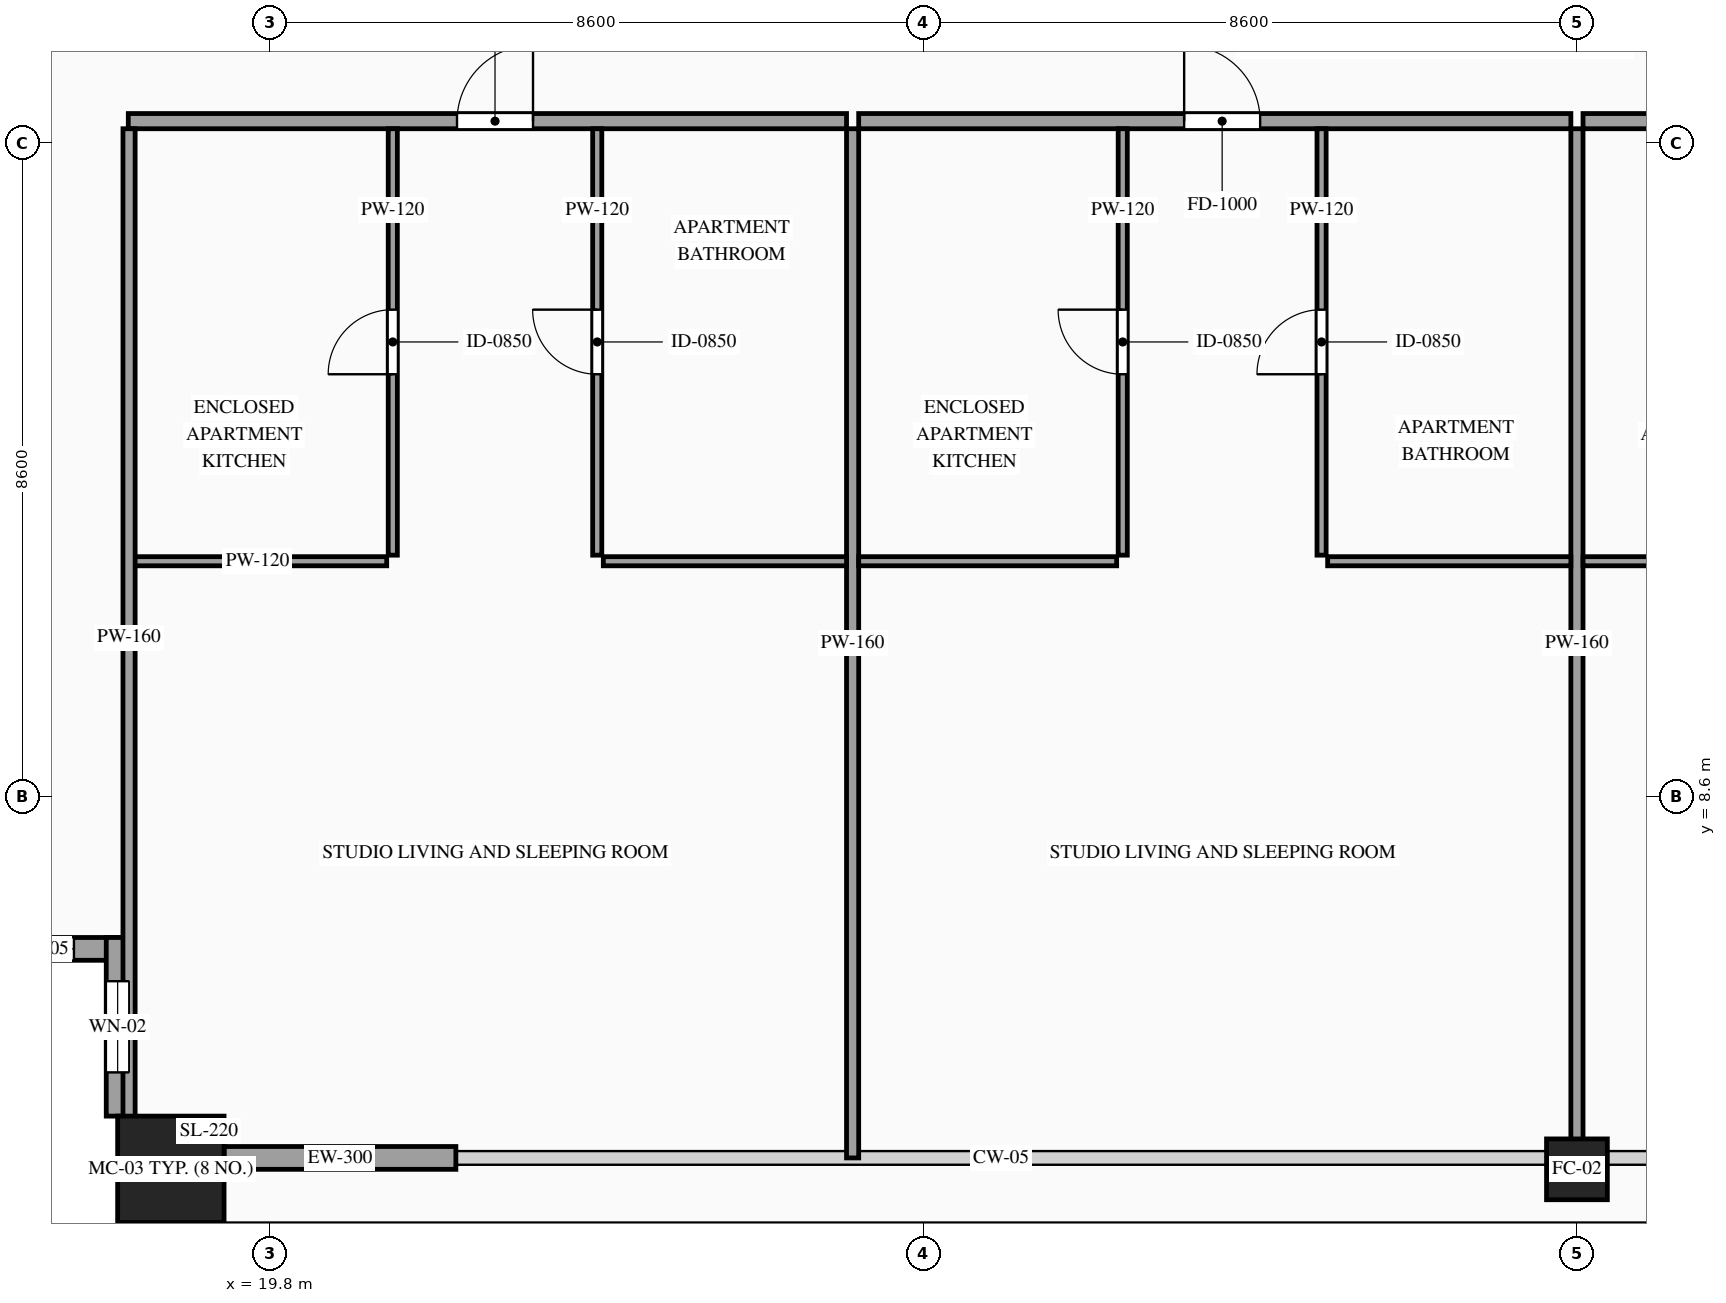
"""IFC4 building model, lengths in metres.
Left out: names, types, materials, properties, quantities, classifications, styles, units other than length and angle.
Written with IfcOpenShell. Run it as: python <this file> out.ifc"""

import sys

from ifc_helpers import new_model, si_unit, direction, frame, frame_2d, origin, origin_2d, place, context, subcontext, project, spatial, rectangle, hollow_rectangle, extrude, source, transform, mapped, element, fill, save


model = new_model("IFC4")
c1 = context("Model", 3, precision=1e-05, world=origin(), true_north=direction((0.0, 1.0)))
c2 = subcontext(c1, "Body", "Model", "MODEL_VIEW")
j1 = project(units=[si_unit("LENGTHUNIT", "METRE"), si_unit("PLANEANGLEUNIT", "RADIAN")], contexts=[c1])
p1 = place(None, origin())
s1 = spatial("IfcSite", under=j1, at=p1, CompositionType="ELEMENT")
p2 = place(p1, origin())
s2 = spatial("IfcBuilding", under=s1, at=p2, CompositionType="ELEMENT")
p3 = place(p2, frame((0.0, 0.0, 181.0)))
s3 = spatial("IfcBuildingStorey", under=s2, at=p3, CompositionType="ELEMENT", Elevation=181.0)
m1 = source(origin(), c2, "Body", "SweptSolid", [
    extrude(hollow_rectangle(XDim=1.4, YDim=1.4, WallThickness=0.06, at=origin_2d()), origin(), (0.0, 0.0, 1.0), 3.5),
])
p4 = place(p3, frame((18.5, 3.7, 0.0), z_axis=(0.0, 0.0, 1.0), x_axis=(1.0, 0.0, 0.0)))
e1 = element("IfcColumn", 1, at=p4, inside=s3, PredefinedType="COLUMN", context=c2, shape_type="MappedRepresentation", body=[
    mapped(m1, transform((0.0, 0.0, 0.0), scale=1.0)),
])
m2 = source(origin(), c2, "Body", "SweptSolid", [
    extrude(hollow_rectangle(XDim=0.8, YDim=0.8, WallThickness=0.036, at=origin_2d()), origin(), (0.0, 0.0, 1.0), 3.5),
])
p5 = place(p3, frame((37.0, 3.7, 0.0), z_axis=(0.0, 0.0, 1.0), x_axis=(1.0, 0.0, 0.0)))
e2 = element("IfcColumn", 2, at=p5, inside=s3, PredefinedType="COLUMN", context=c2, shape_type="MappedRepresentation", body=[
    mapped(m2, transform((0.0, 0.0, 0.0), scale=1.0)),
])
p6 = place(p3, frame((15.6, 6.6, 0.0), z_axis=(0.0, 0.0, 1.0), x_axis=(1.0, 0.0, 0.0)))
e3 = element("IfcWall", 3, at=p6, inside=s3, PredefinedType="SOLIDWALL", context=c2, shape_type="SweptSolid", body=[
    extrude(rectangle(XDim=2.35, YDim=0.3, at=frame_2d((1.175, 0.0))), origin(), (0.0, 0.0, 1.0), 3.28),
])
p7 = place(p6, frame((0.725, 0.0, 0.85)))
e4 = element("IfcOpeningElement", 4, at=p7, cuts=e3, PredefinedType="OPENING", context=c2, shape_type="SweptSolid", body=[
    extrude(rectangle(XDim=0.9, YDim=1.5, at=frame_2d((0.45, 0.75))), frame((0.0, 0.165, 0.0), z_axis=(0.0, -1.0, 0.0), x_axis=(1.0, 0.0, 0.0)), (0.0, 0.0, 1.0), 0.33),
])
p8 = place(p3, frame((17.8, 6.75, 0.0), z_axis=(0.0, 0.0, 1.0), x_axis=(0.0, -1.0, 0.0)))
e5 = element("IfcWall", 5, at=p8, inside=s3, PredefinedType="SOLIDWALL", context=c2, shape_type="SweptSolid", body=[
    extrude(rectangle(XDim=2.35, YDim=0.3, at=frame_2d((1.175, 0.0))), origin(), (0.0, 0.0, 1.0), 3.28),
])
p9 = place(p8, frame((0.575, 0.0, 0.85)))
e6 = element("IfcOpeningElement", 6, at=p9, cuts=e5, PredefinedType="OPENING", context=c2, shape_type="SweptSolid", body=[
    extrude(rectangle(XDim=1.2, YDim=2.1, at=frame_2d((0.6, 1.05))), frame((0.0, 0.165, 0.0), z_axis=(0.0, -1.0, 0.0), x_axis=(1.0, 0.0, 0.0)), (0.0, 0.0, 1.0), 0.33),
])
m3 = source(origin(), c2, "Body", "SweptSolid", [
    extrude(rectangle(XDim=3.05, YDim=0.3, at=frame_2d((1.525, 0.0))), origin(), (0.0, 0.0, 1.0), 2.835),
])
p10 = place(p3, frame((19.2, 3.85, 0.0), z_axis=(0.0, 0.0, 1.0), x_axis=(1.0, 0.0, 0.0)))
e7 = element("IfcWall", 7, at=p10, inside=s3, PredefinedType="SOLIDWALL", context=c2, shape_type="MappedRepresentation", body=[
    mapped(m3, transform((0.0, 0.0, 0.0), scale=1.0)),
])
p11 = place(p3, frame((17.94, 17.49, 0.0), z_axis=(0.0, 0.0, 1.0), x_axis=(1.0, 0.0, 0.0)))
e8 = element("IfcWall", 8, at=p11, inside=s3, PredefinedType="PARTITIONING", context=c2, shape_type="SweptSolid", body=[
    extrude(rectangle(XDim=9.45, YDim=0.2, at=frame_2d((4.725, 0.0))), origin(), (0.0, 0.0, 1.0), 3.28),
])
p12 = place(p11, frame((4.325, 0.0, 0.0)))
e9 = element("IfcOpeningElement", 9, at=p12, cuts=e8, PredefinedType="OPENING", context=c2, shape_type="SweptSolid", body=[
    extrude(rectangle(XDim=1.0, YDim=2.2, at=frame_2d((0.5, 1.1))), frame((0.0, 0.115, 0.0), z_axis=(0.0, -1.0, 0.0), x_axis=(1.0, 0.0, 0.0)), (0.0, 0.0, 1.0), 0.23),
])
m4 = source(origin(), c2, "Body", "SweptSolid", [
    extrude(rectangle(XDim=13.54, YDim=0.16, at=frame_2d((6.77, 0.0))), origin(), (0.0, 0.0, 1.0), 3.28),
])
p13 = place(p3, frame((27.47, 3.85, 0.0), z_axis=(0.0, 0.0, 1.0), x_axis=(0.0, 1.0, 0.0)))
e10 = element("IfcWall", 10, at=p13, inside=s3, PredefinedType="PARTITIONING", context=c2, shape_type="MappedRepresentation", body=[
    mapped(m4, transform((0.0, 0.0, 0.0), scale=1.0)),
])
m5 = source(origin(), c2, "Body", "SweptSolid", [
    extrude(rectangle(XDim=3.4, YDim=0.12, at=frame_2d((1.7, 0.0))), origin(), (0.0, 0.0, 1.0), 3.28),
])
p14 = place(p3, frame((17.94, 11.7, 0.0), z_axis=(0.0, 0.0, 1.0), x_axis=(1.0, 0.0, 0.0)))
e11 = element("IfcWall", 11, at=p14, inside=s3, PredefinedType="PARTITIONING", context=c2, shape_type="MappedRepresentation", body=[
    mapped(m5, transform((0.0, 0.0, 0.0), scale=1.0)),
])
p15 = place(p3, frame((21.42, 11.78, 0.0), z_axis=(0.0, 0.0, 1.0), x_axis=(0.0, 1.0, 0.0)))
e12 = element("IfcWall", 12, at=p15, inside=s3, PredefinedType="PARTITIONING", context=c2, shape_type="SweptSolid", body=[
    extrude(rectangle(XDim=5.61, YDim=0.12, at=frame_2d((2.805, 0.0))), origin(), (0.0, 0.0, 1.0), 3.28),
])
p16 = place(p15, frame((2.38, 0.0, 0.0)))
e13 = element("IfcOpeningElement", 13, at=p16, cuts=e12, PredefinedType="OPENING", context=c2, shape_type="SweptSolid", body=[
    extrude(rectangle(XDim=0.85, YDim=2.1, at=frame_2d((0.425, 1.05))), frame((0.0, 0.075, 0.0), z_axis=(0.0, -1.0, 0.0), x_axis=(1.0, 0.0, 0.0)), (0.0, 0.0, 1.0), 0.15),
])
m6 = source(origin(), c2, "Body", "SweptSolid", [
    extrude(rectangle(XDim=3.2, YDim=0.12, at=frame_2d((1.6, 0.0))), origin(), (0.0, 0.0, 1.0), 2.875),
])
p17 = place(p3, frame((24.19, 11.7, 0.0), z_axis=(0.0, 0.0, 1.0), x_axis=(1.0, 0.0, 0.0)))
e14 = element("IfcWall", 14, at=p17, inside=s3, PredefinedType="PARTITIONING", context=c2, shape_type="MappedRepresentation", body=[
    mapped(m6, transform((0.0, 0.0, 0.0), scale=1.0)),
])
p18 = place(p3, frame((24.11, 11.78, 0.0), z_axis=(0.0, 0.0, 1.0), x_axis=(0.0, 1.0, 0.0)))
e15 = element("IfcWall", 15, at=p18, inside=s3, PredefinedType="PARTITIONING", context=c2, shape_type="SweptSolid", body=[
    extrude(rectangle(XDim=5.61, YDim=0.12, at=frame_2d((2.805, 0.0))), origin(), (0.0, 0.0, 1.0), 3.28),
])
p19 = place(p18, frame((2.38, 0.0, 0.0)))
e16 = element("IfcOpeningElement", 16, at=p19, cuts=e15, PredefinedType="OPENING", context=c2, shape_type="SweptSolid", body=[
    extrude(rectangle(XDim=0.85, YDim=2.1, at=frame_2d((0.425, 1.05))), frame((0.0, 0.075, 0.0), z_axis=(0.0, -1.0, 0.0), x_axis=(1.0, 0.0, 0.0)), (0.0, 0.0, 1.0), 0.15),
])
p20 = place(p3, frame((27.55, 17.49, 0.0), z_axis=(0.0, 0.0, 1.0), x_axis=(1.0, 0.0, 0.0)))
e17 = element("IfcWall", 17, at=p20, inside=s3, PredefinedType="PARTITIONING", context=c2, shape_type="SweptSolid", body=[
    extrude(rectangle(XDim=9.37, YDim=0.2, at=frame_2d((4.685, 0.0))), origin(), (0.0, 0.0, 1.0), 3.28),
])
p21 = place(p20, frame((4.282, 0.0, 0.0)))
e18 = element("IfcOpeningElement", 18, at=p21, cuts=e17, PredefinedType="OPENING", context=c2, shape_type="SweptSolid", body=[
    extrude(rectangle(XDim=1.0, YDim=2.2, at=frame_2d((0.5, 1.1))), frame((0.0, 0.115, 0.0), z_axis=(0.0, -1.0, 0.0), x_axis=(1.0, 0.0, 0.0)), (0.0, 0.0, 1.0), 0.23),
])
m7 = source(origin(), c2, "Body", "SweptSolid", [
    extrude(rectangle(XDim=13.54, YDim=0.16, at=frame_2d((6.77, 0.0))), origin(), (0.0, 0.0, 1.0), 2.687),
])
p22 = place(p3, frame((37.0, 3.85, 0.0), z_axis=(0.0, 0.0, 1.0), x_axis=(0.0, 1.0, 0.0)))
e19 = element("IfcWall", 19, at=p22, inside=s3, PredefinedType="PARTITIONING", context=c2, shape_type="MappedRepresentation", body=[
    mapped(m7, transform((0.0, 0.0, 0.0), scale=1.0)),
])
m8 = source(origin(), c2, "Body", "SweptSolid", [
    extrude(rectangle(XDim=3.394, YDim=0.12, at=frame_2d((1.697, 0.0))), origin(), (0.0, 0.0, 1.0), 2.875),
])
p23 = place(p3, frame((27.55, 11.7, 0.0), z_axis=(0.0, 0.0, 1.0), x_axis=(1.0, 0.0, 0.0)))
e20 = element("IfcWall", 20, at=p23, inside=s3, PredefinedType="PARTITIONING", context=c2, shape_type="MappedRepresentation", body=[
    mapped(m8, transform((0.0, 0.0, 0.0), scale=1.0)),
])
p24 = place(p3, frame((31.024, 11.78, 0.0), z_axis=(0.0, 0.0, 1.0), x_axis=(0.0, 1.0, 0.0)))
e21 = element("IfcWall", 21, at=p24, inside=s3, PredefinedType="PARTITIONING", context=c2, shape_type="SweptSolid", body=[
    extrude(rectangle(XDim=5.61, YDim=0.12, at=frame_2d((2.805, 0.0))), origin(), (0.0, 0.0, 1.0), 3.28),
])
p25 = place(p24, frame((2.38, 0.0, 0.0)))
e22 = element("IfcOpeningElement", 22, at=p25, cuts=e21, PredefinedType="OPENING", context=c2, shape_type="SweptSolid", body=[
    extrude(rectangle(XDim=0.85, YDim=2.1, at=frame_2d((0.425, 1.05))), frame((0.0, 0.075, 0.0), z_axis=(0.0, -1.0, 0.0), x_axis=(1.0, 0.0, 0.0)), (0.0, 0.0, 1.0), 0.15),
])
p26 = place(p3, frame((33.72, 11.7, 0.0), z_axis=(0.0, 0.0, 1.0), x_axis=(1.0, 0.0, 0.0)))
e23 = element("IfcWall", 23, at=p26, inside=s3, PredefinedType="PARTITIONING", context=c2, shape_type="MappedRepresentation", body=[
    mapped(m6, transform((0.0, 0.0, 0.0), scale=1.0)),
])
p27 = place(p3, frame((33.64, 11.78, 0.0), z_axis=(0.0, 0.0, 1.0), x_axis=(0.0, 1.0, 0.0)))
e24 = element("IfcWall", 24, at=p27, inside=s3, PredefinedType="PARTITIONING", context=c2, shape_type="SweptSolid", body=[
    extrude(rectangle(XDim=5.61, YDim=0.12, at=frame_2d((2.805, 0.0))), origin(), (0.0, 0.0, 1.0), 3.28),
])
p28 = place(p27, frame((2.38, 0.0, 0.0)))
e25 = element("IfcOpeningElement", 25, at=p28, cuts=e24, PredefinedType="OPENING", context=c2, shape_type="SweptSolid", body=[
    extrude(rectangle(XDim=0.85, YDim=2.1, at=frame_2d((0.425, 1.05))), frame((0.0, 0.075, 0.0), z_axis=(0.0, -1.0, 0.0), x_axis=(1.0, 0.0, 0.0)), (0.0, 0.0, 1.0), 0.15),
])
p29 = place(p3, frame((37.08, 17.49, 0.0), z_axis=(0.0, 0.0, 1.0), x_axis=(1.0, 0.0, 0.0)))
e26 = element("IfcWall", 26, at=p29, inside=s3, PredefinedType="PARTITIONING", context=c2, shape_type="SweptSolid", body=[
    extrude(rectangle(XDim=9.37, YDim=0.2, at=frame_2d((4.685, 0.0))), origin(), (0.0, 0.0, 1.0), 3.28),
])
p30 = place(p29, frame((4.282, 0.0, 0.0)))
e27 = element("IfcOpeningElement", 27, at=p30, cuts=e26, PredefinedType="OPENING", context=c2, shape_type="SweptSolid", body=[
    extrude(rectangle(XDim=1.0, YDim=2.2, at=frame_2d((0.5, 1.1))), frame((0.0, 0.115, 0.0), z_axis=(0.0, -1.0, 0.0), x_axis=(1.0, 0.0, 0.0)), (0.0, 0.0, 1.0), 0.23),
])
p31 = place(p3, frame((37.08, 11.7, 0.0), z_axis=(0.0, 0.0, 1.0), x_axis=(1.0, 0.0, 0.0)))
e28 = element("IfcWall", 28, at=p31, inside=s3, PredefinedType="PARTITIONING", context=c2, shape_type="MappedRepresentation", body=[
    mapped(m8, transform((0.0, 0.0, 0.0), scale=1.0)),
])
m9 = source(origin(), c2, "Body", "SweptSolid", [
    extrude(rectangle(XDim=13.39, YDim=0.16, at=frame_2d((6.695, 0.0))), origin(), (0.0, 0.0, 1.0), 3.28),
])
p32 = place(p3, frame((17.95, 4.0, 0.0), z_axis=(0.0, 0.0, 1.0), x_axis=(0.0, 1.0, 0.0)))
e29 = element("IfcWall", 29, at=p32, inside=s3, PredefinedType="PARTITIONING", context=c2, shape_type="MappedRepresentation", body=[
    mapped(m9, transform((0.0, 0.0, 0.0), scale=1.0)),
])
m10 = source(origin(), c2, "Body", "SweptSolid", [
    extrude(rectangle(XDim=0.9, YDim=1.5, at=frame_2d((0.45, 0.75))), frame((0.0, 0.03, 0.0), z_axis=(0.0, -1.0, 0.0), x_axis=(1.0, 0.0, 0.0)), (0.0, 0.0, 1.0), 0.06),
])
p33 = place(p7, origin())
e30 = element("IfcWindow", 30, at=p33, inside=s3, PartitioningType="SINGLE_PANEL", PredefinedType="WINDOW", context=c2, shape_type="MappedRepresentation", body=[
    mapped(m10, transform((0.0, 0.0, 0.0), scale=1.0)),
])
fill(e4, e30)
m11 = source(origin(), c2, "Body", "SweptSolid", [
    extrude(rectangle(XDim=1.2, YDim=2.1, at=frame_2d((0.6, 1.05))), frame((0.0, 0.03, 0.0), z_axis=(0.0, -1.0, 0.0), x_axis=(1.0, 0.0, 0.0)), (0.0, 0.0, 1.0), 0.06),
])
p34 = place(p9, origin())
e31 = element("IfcWindow", 31, at=p34, inside=s3, PartitioningType="SINGLE_PANEL", PredefinedType="WINDOW", context=c2, shape_type="MappedRepresentation", body=[
    mapped(m11, transform((0.0, 0.0, 0.0), scale=1.0)),
])
fill(e6, e31)
m12 = source(origin(), c2, "Body", "SweptSolid", [
    extrude(rectangle(XDim=1.0, YDim=2.2, at=frame_2d((0.5, 1.1))), frame((0.0, 0.025, 0.0), z_axis=(0.0, -1.0, 0.0), x_axis=(1.0, 0.0, 0.0)), (0.0, 0.0, 1.0), 0.05),
])
p35 = place(p12, origin())
e32 = element("IfcDoor", 32, at=p35, inside=s3, OperationType="SINGLE_SWING_RIGHT", PredefinedType="DOOR", context=c2, shape_type="MappedRepresentation", body=[
    mapped(m12, transform((0.0, 0.0, 0.0), scale=1.0)),
])
fill(e9, e32)
m13 = source(origin(), c2, "Body", "SweptSolid", [
    extrude(rectangle(XDim=0.85, YDim=2.1, at=frame_2d((0.425, 1.05))), frame((0.0, 0.025, 0.0), z_axis=(0.0, -1.0, 0.0), x_axis=(1.0, 0.0, 0.0)), (0.0, 0.0, 1.0), 0.05),
])
p36 = place(p16, origin())
e33 = element("IfcDoor", 33, at=p36, inside=s3, OperationType="SINGLE_SWING_LEFT", PredefinedType="DOOR", context=c2, shape_type="MappedRepresentation", body=[
    mapped(m13, transform((0.0, 0.0, 0.0), scale=1.0)),
])
fill(e13, e33)
p37 = place(p19, origin())
e34 = element("IfcDoor", 34, at=p37, inside=s3, OperationType="SINGLE_SWING_RIGHT", PredefinedType="DOOR", context=c2, shape_type="MappedRepresentation", body=[
    mapped(m13, transform((0.0, 0.0, 0.0), scale=1.0)),
])
fill(e16, e34)
p38 = place(p21, origin())
e35 = element("IfcDoor", 35, at=p38, inside=s3, OperationType="SINGLE_SWING_LEFT", PredefinedType="DOOR", context=c2, shape_type="MappedRepresentation", body=[
    mapped(m12, transform((0.0, 0.0, 0.0), scale=1.0)),
])
fill(e18, e35)
p39 = place(p25, origin())
e36 = element("IfcDoor", 36, at=p39, inside=s3, OperationType="SINGLE_SWING_RIGHT", PredefinedType="DOOR", context=c2, shape_type="MappedRepresentation", body=[
    mapped(m13, transform((0.0, 0.0, 0.0), scale=1.0)),
])
fill(e22, e36)
p40 = place(p28, origin())
e37 = element("IfcDoor", 37, at=p40, inside=s3, OperationType="SINGLE_SWING_LEFT", PredefinedType="DOOR", context=c2, shape_type="MappedRepresentation", body=[
    mapped(m13, transform((0.0, 0.0, 0.0), scale=1.0)),
])
fill(e25, e37)
save(model, sys.argv[1])
